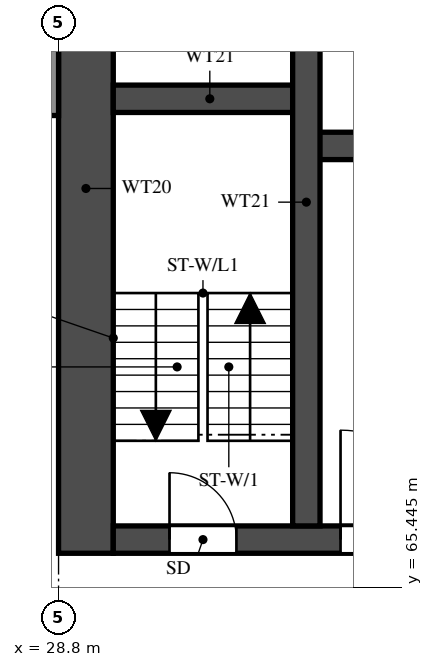
"""IFC4 building model, lengths in metres.
Left out: names, types, materials, properties, quantities, classifications, styles, units other than length and angle.
Written with IfcOpenShell. Run it as: python <this file> out.ifc"""

import sys

from ifc_helpers import new_model, si_unit, direction, frame, frame_2d, origin, place, context, subcontext, project, spatial, rectangle, extrude, element, fill, save


model = new_model("IFC4")
c1 = context("Model", 3, precision=1e-05, world=origin(), true_north=direction((0.0, 1.0)))
c2 = subcontext(c1, "Body", "Model", "MODEL_VIEW")
j1 = project(units=[si_unit("LENGTHUNIT", "METRE"), si_unit("PLANEANGLEUNIT", "RADIAN")], contexts=[c1])
p1 = place(None, origin())
s1 = spatial("IfcSite", under=j1, at=p1, CompositionType="ELEMENT")
p2 = place(p1, origin())
s2 = spatial("IfcBuilding", under=s1, at=p2, CompositionType="ELEMENT")
p3 = place(p2, frame((0.0, 0.0, 41.0)))
s3 = spatial("IfcBuildingStorey", under=s2, at=p3, CompositionType="ELEMENT", Elevation=41.0)
p4 = place(p3, frame((29.25, 66.0, 0.0), z_axis=(0.0, 0.0, 1.0), x_axis=(0.0, 1.0, 0.0)))
e1 = element("IfcWall", 1, at=p4, inside=s3, PredefinedType="SHEAR", context=c2, shape_type="SweptSolid", body=[
    extrude(rectangle(XDim=12.0, YDim=0.9, at=frame_2d((6.0, 0.0))), origin(), (0.0, 0.0, 1.0), 3.18),
])
p5 = place(p3, frame((29.7, 66.225, 0.0), z_axis=(0.0, 0.0, 1.0), x_axis=(1.0, 0.0, 0.0)))
e2 = element("IfcWall", 2, at=p5, inside=s3, PredefinedType="SHEAR", context=c2, shape_type="SweptSolid", body=[
    extrude(rectangle(XDim=41.4, YDim=0.45, at=frame_2d((20.7, 0.0))), origin(), (0.0, 0.0, 1.0), 3.18),
])
p6 = place(p5, frame((0.925, 0.0, 0.0)))
e3 = element("IfcOpeningElement", 3, at=p6, cuts=e2, PredefinedType="OPENING", context=c2, shape_type="SweptSolid", body=[
    extrude(rectangle(XDim=1.1, YDim=2.1, at=frame_2d((0.55, 1.05))), frame((0.0, 0.235, 0.0), z_axis=(0.0, -1.0, 0.0), x_axis=(1.0, 0.0, 0.0)), (0.0, 0.0, 1.0), 0.47),
])
p7 = place(p5, frame((3.738, 0.0, 0.0)))
e4 = element("IfcOpeningElement", 4, at=p7, cuts=e2, PredefinedType="OPENING", context=c2, shape_type="SweptSolid", body=[
    extrude(rectangle(XDim=1.8, YDim=2.1, at=frame_2d((0.9, 1.05))), frame((0.0, 0.235, 0.0), z_axis=(0.0, -1.0, 0.0), x_axis=(1.0, 0.0, 0.0)), (0.0, 0.0, 1.0), 0.47),
])
p8 = place(p3, frame((32.875, 72.7, 0.0), z_axis=(0.0, 0.0, 1.0), x_axis=(1.0, 0.0, 0.0)))
e5 = element("IfcWall", 5, at=p8, inside=s3, PredefinedType="SHEAR", context=c2, shape_type="SweptSolid", body=[
    extrude(rectangle(XDim=35.05, YDim=0.45, at=frame_2d((17.525, 0.0))), origin(), (0.0, 0.0, 1.0), 3.18),
])
p9 = place(p8, frame((19.8, 0.0, 0.0)))
e6 = element("IfcOpeningElement", 6, at=p9, cuts=e5, PredefinedType="OPENING", context=c2, shape_type="SweptSolid", body=[
    extrude(rectangle(XDim=1.1, YDim=2.1, at=frame_2d((0.55, 1.05))), frame((0.0, 0.235, 0.0), z_axis=(0.0, -1.0, 0.0), x_axis=(1.0, 0.0, 0.0)), (0.0, 0.0, 1.0), 0.47),
])
p10 = place(p8, frame((27.65, 0.0, 0.0)))
e7 = element("IfcOpeningElement", 7, at=p10, cuts=e5, PredefinedType="OPENING", context=c2, shape_type="SweptSolid", body=[
    extrude(rectangle(XDim=1.1, YDim=2.1, at=frame_2d((0.55, 1.05))), frame((0.0, 0.235, 0.0), z_axis=(0.0, -1.0, 0.0), x_axis=(1.0, 0.0, 0.0)), (0.0, 0.0, 1.0), 0.47),
])
p11 = place(p8, frame((30.25, 0.0, 0.0)))
e8 = element("IfcOpeningElement", 8, at=p11, cuts=e5, PredefinedType="OPENING", context=c2, shape_type="SweptSolid", body=[
    extrude(rectangle(XDim=1.1, YDim=2.1, at=frame_2d((0.55, 1.05))), frame((0.0, 0.235, 0.0), z_axis=(0.0, -1.0, 0.0), x_axis=(1.0, 0.0, 0.0)), (0.0, 0.0, 1.0), 0.47),
])
p12 = place(p8, frame((3.75, 0.0, 0.0)))
e9 = element("IfcOpeningElement", 9, at=p12, cuts=e5, PredefinedType="OPENING", context=c2, shape_type="SweptSolid", body=[
    extrude(rectangle(XDim=1.1, YDim=2.1, at=frame_2d((0.55, 1.05))), frame((0.0, 0.235, 0.0), z_axis=(0.0, -1.0, 0.0), x_axis=(1.0, 0.0, 0.0)), (0.0, 0.0, 1.0), 0.47),
])
p13 = place(p8, frame((6.5, 0.0, 0.0)))
e10 = element("IfcOpeningElement", 10, at=p13, cuts=e5, PredefinedType="OPENING", context=c2, shape_type="SweptSolid", body=[
    extrude(rectangle(XDim=1.1, YDim=2.1, at=frame_2d((0.55, 1.05))), frame((0.0, 0.235, 0.0), z_axis=(0.0, -1.0, 0.0), x_axis=(1.0, 0.0, 0.0)), (0.0, 0.0, 1.0), 0.47),
])
p14 = place(p8, frame((9.25, 0.0, 0.0)))
e11 = element("IfcOpeningElement", 11, at=p14, cuts=e5, PredefinedType="OPENING", context=c2, shape_type="SweptSolid", body=[
    extrude(rectangle(XDim=1.1, YDim=2.1, at=frame_2d((0.55, 1.05))), frame((0.0, 0.235, 0.0), z_axis=(0.0, -1.0, 0.0), x_axis=(1.0, 0.0, 0.0)), (0.0, 0.0, 1.0), 0.47),
])
p15 = place(p8, frame((12.0, 0.0, 0.0)))
e12 = element("IfcOpeningElement", 12, at=p15, cuts=e5, PredefinedType="OPENING", context=c2, shape_type="SweptSolid", body=[
    extrude(rectangle(XDim=1.1, YDim=2.1, at=frame_2d((0.55, 1.05))), frame((0.0, 0.235, 0.0), z_axis=(0.0, -1.0, 0.0), x_axis=(1.0, 0.0, 0.0)), (0.0, 0.0, 1.0), 0.47),
])
p16 = place(p8, frame((14.75, 0.0, 0.0)))
e13 = element("IfcOpeningElement", 13, at=p16, cuts=e5, PredefinedType="OPENING", context=c2, shape_type="SweptSolid", body=[
    extrude(rectangle(XDim=1.1, YDim=2.1, at=frame_2d((0.55, 1.05))), frame((0.0, 0.235, 0.0), z_axis=(0.0, -1.0, 0.0), x_axis=(1.0, 0.0, 0.0)), (0.0, 0.0, 1.0), 0.47),
])
p17 = place(p8, frame((17.5, 0.0, 0.0)))
e14 = element("IfcOpeningElement", 14, at=p17, cuts=e5, PredefinedType="OPENING", context=c2, shape_type="SweptSolid", body=[
    extrude(rectangle(XDim=1.1, YDim=2.1, at=frame_2d((0.55, 1.05))), frame((0.0, 0.235, 0.0), z_axis=(0.0, -1.0, 0.0), x_axis=(1.0, 0.0, 0.0)), (0.0, 0.0, 1.0), 0.47),
])
p18 = place(p8, frame((0.913, 0.0, 0.0)))
e15 = element("IfcOpeningElement", 15, at=p18, cuts=e5, PredefinedType="OPENING", context=c2, shape_type="SweptSolid", body=[
    extrude(rectangle(XDim=1.1, YDim=2.1, at=frame_2d((0.55, 1.05))), frame((0.0, 0.235, 0.0), z_axis=(0.0, -1.0, 0.0), x_axis=(1.0, 0.0, 0.0)), (0.0, 0.0, 1.0), 0.47),
])
p19 = place(p3, frame((29.7, 73.475, 0.0), z_axis=(0.0, 0.0, 1.0), x_axis=(1.0, 0.0, 0.0)))
e16 = element("IfcWall", 16, at=p19, inside=s3, PredefinedType="SHEAR", context=c2, shape_type="SweptSolid", body=[
    extrude(rectangle(XDim=3.175, YDim=0.45, at=frame_2d((1.587, 0.0))), origin(), (0.0, 0.0, 1.0), 3.18),
])
p20 = place(p3, frame((32.875, 66.45, 0.0), z_axis=(0.0, 0.0, 1.0), x_axis=(0.0, 1.0, 0.0)))
e17 = element("IfcWall", 17, at=p20, inside=s3, PredefinedType="SHEAR", context=c2, shape_type="SweptSolid", body=[
    extrude(rectangle(XDim=10.65, YDim=0.45, at=frame_2d((5.325, 0.0))), origin(), (0.0, 0.0, 1.0), 3.18),
])
p21 = place(p3, frame((28.7, 73.2, 0.0), z_axis=(0.0, 0.0, 1.0), x_axis=(0.0, 1.0, 0.0)))
e18 = element("IfcWall", 18, at=p21, inside=s3, PredefinedType="SOLIDWALL", context=c2, shape_type="SweptSolid", body=[
    extrude(rectangle(XDim=4.8, YDim=0.2, at=frame_2d((2.4, 0.0))), origin(), (0.0, 0.0, 1.0), 3.18),
])
p22 = place(p6, origin())
e19 = element("IfcDoor", 19, at=p22, inside=s3, OperationType="SINGLE_SWING_LEFT", PredefinedType="DOOR", context=c2, shape_type="SweptSolid", body=[
    extrude(rectangle(XDim=1.1, YDim=2.1, at=frame_2d((0.55, 1.05))), frame((0.0, 0.025, 0.0), z_axis=(0.0, -1.0, 0.0), x_axis=(1.0, 0.0, 0.0)), (0.0, 0.0, 1.0), 0.05),
])
fill(e3, e19)
p23 = place(p7, origin())
e20 = element("IfcDoor", 20, at=p23, inside=s3, OperationType="DOUBLE_DOOR_SINGLE_SWING", PredefinedType="DOOR", context=c2, shape_type="SweptSolid", body=[
    extrude(rectangle(XDim=1.8, YDim=2.1, at=frame_2d((0.9, 1.05))), frame((0.0, 0.025, 0.0), z_axis=(0.0, -1.0, 0.0), x_axis=(1.0, 0.0, 0.0)), (0.0, 0.0, 1.0), 0.05),
])
fill(e4, e20)
save(model, sys.argv[1])
